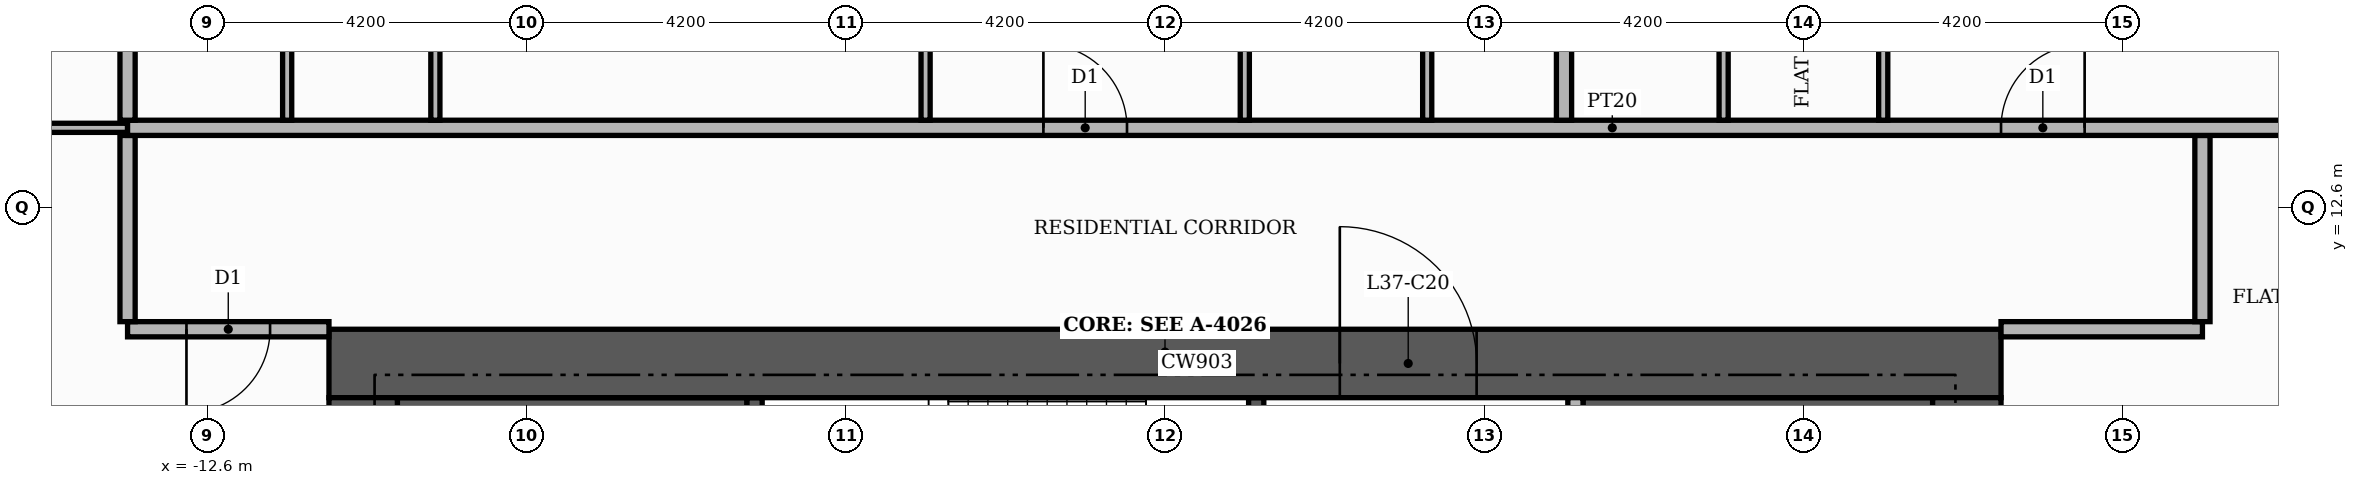
"""IFC4 building model, lengths in metres.
Left out: names, types, materials, properties, quantities, classifications, styles, units other than length and angle.
Written with IfcOpenShell. Run it as: python <this file> out.ifc"""

import sys

from ifc_helpers import new_model, si_unit, direction, frame, frame_2d, origin, place, context, subcontext, project, spatial, rectangle, extrude, element, fill, save


model = new_model("IFC4")
c1 = context("Model", 3, precision=1e-05, world=origin(), true_north=direction((0.0, 1.0)))
c2 = subcontext(c1, "Body", "Model", "MODEL_VIEW")
j1 = project(units=[si_unit("LENGTHUNIT", "METRE"), si_unit("PLANEANGLEUNIT", "RADIAN")], contexts=[c1])
p1 = place(None, origin())
s1 = spatial("IfcSite", under=j1, at=p1, CompositionType="ELEMENT")
p2 = place(p1, origin())
s2 = spatial("IfcBuilding", under=s1, at=p2, CompositionType="ELEMENT")
p3 = place(p2, frame((0.0, 0.0, 157.2)))
s3 = spatial("IfcBuildingStorey", under=s2, at=p3, CompositionType="ELEMENT", Elevation=157.2)
for number, where, z_axis, x_axis in (
    (1, (-10.1, 9.15, 0.0), (0.0, 0.0, 1.0), (1.0, 0.0, 0.0)),
    (2, (5.5, 9.15, 0.0), (0.0, 0.0, 1.0), (1.0, 0.0, 0.0)),
):
    element("IfcWall", number, at=place(p3, frame(where, z_axis=z_axis, x_axis=x_axis)), inside=s3, PredefinedType="SHEAR", context=c2, shape_type="SweptSolid", body=[
        extrude(rectangle(XDim=4.6, YDim=1.9, at=frame_2d((2.3, 0.0))), origin(), (0.0, 0.0, 1.0), 3.48),
    ])
p4 = place(p3, frame((-5.4, 7.25, 0.0), z_axis=(0.0, 0.0, 1.0), x_axis=(0.0, 1.0, 0.0)))
e3 = element("IfcWall", 3, at=p4, inside=s3, PredefinedType="SHEAR", context=c2, shape_type="SweptSolid", body=[
    extrude(rectangle(XDim=2.85, YDim=0.2, at=frame_2d((1.425, 0.0))), origin(), (0.0, 0.0, 1.0), 3.48),
])
p5 = place(p3, frame((1.2, 7.25, 0.0), z_axis=(0.0, 0.0, 1.0), x_axis=(0.0, 1.0, 0.0)))
e4 = element("IfcWall", 4, at=p5, inside=s3, PredefinedType="SHEAR", context=c2, shape_type="SweptSolid", body=[
    extrude(rectangle(XDim=2.85, YDim=0.2, at=frame_2d((1.425, 0.0))), origin(), (0.0, 0.0, 1.0), 3.48),
])
p6 = place(p5, frame((0.85, 0.0, 0.0)))
e5 = element("IfcOpeningElement", 5, at=p6, cuts=e4, PredefinedType="OPENING", context=c2, shape_type="SweptSolid", body=[
    extrude(rectangle(XDim=1.0, YDim=2.1, at=frame_2d((0.5, 1.05))), frame((0.0, 0.11, 0.0), z_axis=(0.0, -1.0, 0.0), x_axis=(1.0, 0.0, 0.0)), (0.0, 0.0, 1.0), 0.22),
])
p7 = place(p3, frame((-11.0, 10.55, 0.0), z_axis=(0.0, 0.0, 1.0), x_axis=(1.0, 0.0, 0.0)))
e6 = element("IfcWall", 6, at=p7, inside=s3, PredefinedType="SHEAR", context=c2, shape_type="SweptSolid", body=[
    extrude(rectangle(XDim=22.0, YDim=0.9, at=frame_2d((11.0, 0.0))), origin(), (0.0, 0.0, 1.0), 3.48),
])
p8 = place(p7, frame((13.3, 0.0, 0.0)))
e7 = element("IfcOpeningElement", 7, at=p8, cuts=e6, PredefinedType="OPENING", context=c2, shape_type="SweptSolid", body=[
    extrude(rectangle(XDim=1.8, YDim=2.2, at=frame_2d((0.9, 1.1))), frame((0.0, 0.46, 0.0), z_axis=(0.0, -1.0, 0.0), x_axis=(1.0, 0.0, 0.0)), (0.0, 0.0, 1.0), 0.92),
])
for number, where, z_axis, x_axis in (
    (8, (-10.55, -10.1, 0.0), (0.0, 0.0, 1.0), (0.0, 1.0, 0.0)),
    (9, (10.55, -10.1, 0.0), (0.0, 0.0, 1.0), (0.0, 1.0, 0.0)),
):
    element("IfcWall", number, at=place(p3, frame(where, z_axis=z_axis, x_axis=x_axis)), inside=s3, PredefinedType="SHEAR", context=c2, shape_type="SweptSolid", body=[
        extrude(rectangle(XDim=20.2, YDim=0.9, at=frame_2d((10.1, 0.0))), origin(), (0.0, 0.0, 1.0), 3.48),
    ])
p9 = place(p3, frame((5.4, 5.5, 0.0), z_axis=(0.0, 0.0, 1.0), x_axis=(0.0, 1.0, 0.0)))
e10 = element("IfcWall", 10, at=p9, inside=s3, PredefinedType="PARTITIONING", context=c2, shape_type="SweptSolid", body=[
    extrude(rectangle(XDim=4.6, YDim=0.2, at=frame_2d((2.3, 0.0))), origin(), (0.0, 0.0, 1.0), 3.48),
])
p10 = place(p9, frame((0.25, 0.0, 0.0)))
e11 = element("IfcOpeningElement", 11, at=p10, cuts=e10, PredefinedType="OPENING", context=c2, shape_type="SweptSolid", body=[
    extrude(rectangle(XDim=1.0, YDim=2.1, at=frame_2d((0.5, 1.05))), frame((0.0, 0.11, 0.0), z_axis=(0.0, -1.0, 0.0), x_axis=(1.0, 0.0, 0.0)), (0.0, 0.0, 1.0), 0.22),
])
p11 = place(p3, frame((-13.65, 11.0, 0.0), z_axis=(0.0, 0.0, 1.0), x_axis=(1.0, 0.0, 0.0)))
e12 = element("IfcWall", 12, at=p11, inside=s3, PredefinedType="PARTITIONING", context=c2, shape_type="SweptSolid", body=[
    extrude(rectangle(XDim=2.65, YDim=0.2, at=frame_2d((1.325, 0.0))), origin(), (0.0, 0.0, 1.0), 3.48),
])
p12 = place(p11, frame((0.775, 0.0, 0.0)))
e13 = element("IfcOpeningElement", 13, at=p12, cuts=e12, PredefinedType="OPENING", context=c2, shape_type="SweptSolid", body=[
    extrude(rectangle(XDim=1.1, YDim=2.4, at=frame_2d((0.55, 1.2))), frame((0.0, 0.11, 0.0), z_axis=(0.0, -1.0, 0.0), x_axis=(1.0, 0.0, 0.0)), (0.0, 0.0, 1.0), 0.22),
])
p13 = place(p3, frame((11.0, 11.0, 0.0), z_axis=(0.0, 0.0, 1.0), x_axis=(1.0, 0.0, 0.0)))
e14 = element("IfcWall", 14, at=p13, inside=s3, PredefinedType="PARTITIONING", context=c2, shape_type="SweptSolid", body=[
    extrude(rectangle(XDim=2.65, YDim=0.2, at=frame_2d((1.325, 0.0))), origin(), (0.0, 0.0, 1.0), 3.48),
])
for number, where, z_axis, x_axis in (
    (15, (-13.65, 11.1, 0.0), (0.0, 0.0, 1.0), (0.0, 1.0, 0.0)),
    (16, (13.65, 11.1, 0.0), (0.0, 0.0, 1.0), (0.0, 1.0, 0.0)),
):
    element("IfcWall", number, at=place(p3, frame(where, z_axis=z_axis, x_axis=x_axis)), inside=s3, PredefinedType="PARTITIONING", context=c2, shape_type="SweptSolid", body=[
        extrude(rectangle(XDim=2.45, YDim=0.2, at=frame_2d((1.225, 0.0))), origin(), (0.0, 0.0, 1.0), 3.48),
    ])
p14 = place(p3, frame((-19.82, 13.65, 0.0), z_axis=(0.0, 0.0, 1.0), x_axis=(1.0, 0.0, 0.0)))
e17 = element("IfcWall", 17, at=p14, inside=s3, PredefinedType="PARTITIONING", context=c2, shape_type="SweptSolid", body=[
    extrude(rectangle(XDim=6.17, YDim=0.12, at=frame_2d((3.085, 0.0))), origin(), (0.0, 0.0, 1.0), 3.48),
])
p15 = place(p14, frame((2.635, 0.0, 0.0)))
e18 = element("IfcOpeningElement", 18, at=p15, cuts=e17, PredefinedType="OPENING", context=c2, shape_type="SweptSolid", body=[
    extrude(rectangle(XDim=0.9, YDim=2.1, at=frame_2d((0.45, 1.05))), frame((0.0, 0.07, 0.0), z_axis=(0.0, -1.0, 0.0), x_axis=(1.0, 0.0, 0.0)), (0.0, 0.0, 1.0), 0.14),
])
p16 = place(p3, frame((-13.65, 13.65, 0.0), z_axis=(0.0, 0.0, 1.0), x_axis=(1.0, 0.0, 0.0)))
e19 = element("IfcWall", 19, at=p16, inside=s3, PredefinedType="PARTITIONING", context=c2, shape_type="SweptSolid", body=[
    extrude(rectangle(XDim=39.07, YDim=0.2, at=frame_2d((19.535, 0.0))), origin(), (0.0, 0.0, 1.0), 3.48),
])
p17 = place(p16, frame((24.65, 0.0, 0.0)))
e20 = element("IfcOpeningElement", 20, at=p17, cuts=e19, PredefinedType="OPENING", context=c2, shape_type="SweptSolid", body=[
    extrude(rectangle(XDim=1.1, YDim=2.4, at=frame_2d((0.55, 1.2))), frame((0.0, 0.11, 0.0), z_axis=(0.0, -1.0, 0.0), x_axis=(1.0, 0.0, 0.0)), (0.0, 0.0, 1.0), 0.22),
])
p18 = place(p16, frame((12.05, 0.0, 0.0)))
e21 = element("IfcOpeningElement", 21, at=p18, cuts=e19, PredefinedType="OPENING", context=c2, shape_type="SweptSolid", body=[
    extrude(rectangle(XDim=1.1, YDim=2.4, at=frame_2d((0.55, 1.2))), frame((0.0, 0.11, 0.0), z_axis=(0.0, -1.0, 0.0), x_axis=(1.0, 0.0, 0.0)), (0.0, 0.0, 1.0), 0.22),
])
p19 = place(p3, frame((-13.65, 13.75, 0.0), z_axis=(0.0, 0.0, 1.0), x_axis=(0.0, 1.0, 0.0)))
e22 = element("IfcWall", 22, at=p19, inside=s3, PredefinedType="PARTITIONING", context=c2, shape_type="SweptSolid", body=[
    extrude(rectangle(XDim=11.67, YDim=0.2, at=frame_2d((5.835, 0.0))), origin(), (0.0, 0.0, 1.0), 3.48),
])
for number, where, z_axis, x_axis in (
    (23, (-11.55, 13.75, 0.0), (0.0, 0.0, 1.0), (0.0, 1.0, 0.0)),
    (24, (-9.6, 13.75, 0.0), (0.0, 0.0, 1.0), (0.0, 1.0, 0.0)),
    (25, (-3.15, 13.75, 0.0), (0.0, 0.0, 1.0), (0.0, 1.0, 0.0)),
):
    element("IfcWall", number, at=place(p3, frame(where, z_axis=z_axis, x_axis=x_axis)), inside=s3, PredefinedType="PARTITIONING", context=c2, shape_type="SweptSolid", body=[
        extrude(rectangle(XDim=4.51, YDim=0.12, at=frame_2d((2.255, 0.0))), origin(), (0.0, 0.0, 1.0), 3.48),
    ])
p20 = place(p3, frame((1.05, 13.75, 0.0), z_axis=(0.0, 0.0, 1.0), x_axis=(0.0, 1.0, 0.0)))
e26 = element("IfcWall", 26, at=p20, inside=s3, PredefinedType="PARTITIONING", context=c2, shape_type="SweptSolid", body=[
    extrude(rectangle(XDim=4.51, YDim=0.12, at=frame_2d((2.255, 0.0))), origin(), (0.0, 0.0, 1.0), 3.48),
])
p21 = place(p20, frame((1.785, 0.0, 0.0)))
e27 = element("IfcOpeningElement", 27, at=p21, cuts=e26, PredefinedType="OPENING", context=c2, shape_type="SweptSolid", body=[
    extrude(rectangle(XDim=0.9, YDim=2.1, at=frame_2d((0.45, 1.05))), frame((0.0, 0.07, 0.0), z_axis=(0.0, -1.0, 0.0), x_axis=(1.0, 0.0, 0.0)), (0.0, 0.0, 1.0), 0.14),
])
p22 = place(p3, frame((3.45, 13.75, 0.0), z_axis=(0.0, 0.0, 1.0), x_axis=(0.0, 1.0, 0.0)))
e28 = element("IfcWall", 28, at=p22, inside=s3, PredefinedType="PARTITIONING", context=c2, shape_type="SweptSolid", body=[
    extrude(rectangle(XDim=4.51, YDim=0.12, at=frame_2d((2.255, 0.0))), origin(), (0.0, 0.0, 1.0), 3.48),
])
p23 = place(p3, frame((5.25, 13.75, 0.0), z_axis=(0.0, 0.0, 1.0), x_axis=(0.0, 1.0, 0.0)))
e29 = element("IfcWall", 29, at=p23, inside=s3, PredefinedType="PARTITIONING", context=c2, shape_type="SweptSolid", body=[
    extrude(rectangle(XDim=6.67, YDim=0.2, at=frame_2d((3.335, 0.0))), origin(), (0.0, 0.0, 1.0), 3.48),
])
p24 = place(p3, frame((7.35, 13.75, 0.0), z_axis=(0.0, 0.0, 1.0), x_axis=(0.0, 1.0, 0.0)))
e30 = element("IfcWall", 30, at=p24, inside=s3, PredefinedType="PARTITIONING", context=c2, shape_type="SweptSolid", body=[
    extrude(rectangle(XDim=4.51, YDim=0.12, at=frame_2d((2.255, 0.0))), origin(), (0.0, 0.0, 1.0), 3.48),
])
p25 = place(p3, frame((9.45, 13.75, 0.0), z_axis=(0.0, 0.0, 1.0), x_axis=(0.0, 1.0, 0.0)))
e31 = element("IfcWall", 31, at=p25, inside=s3, PredefinedType="PARTITIONING", context=c2, shape_type="SweptSolid", body=[
    extrude(rectangle(XDim=4.51, YDim=0.12, at=frame_2d((2.255, 0.0))), origin(), (0.0, 0.0, 1.0), 3.48),
])
p26 = place(p25, frame((1.785, 0.0, 0.0)))
e32 = element("IfcOpeningElement", 32, at=p26, cuts=e31, PredefinedType="OPENING", context=c2, shape_type="SweptSolid", body=[
    extrude(rectangle(XDim=0.9, YDim=2.1, at=frame_2d((0.45, 1.05))), frame((0.0, 0.07, 0.0), z_axis=(0.0, -1.0, 0.0), x_axis=(1.0, 0.0, 0.0)), (0.0, 0.0, 1.0), 0.14),
])
p27 = place(p8, origin())
e33 = element("IfcDoor", 33, at=p27, inside=s3, OperationType="DOUBLE_DOOR_SINGLE_SWING", PredefinedType="DOOR", context=c2, shape_type="SweptSolid", body=[
    extrude(rectangle(XDim=1.8, YDim=2.2, at=frame_2d((0.9, 1.1))), frame((0.0, 0.025, 0.0), z_axis=(0.0, -1.0, 0.0), x_axis=(1.0, 0.0, 0.0)), (0.0, 0.0, 1.0), 0.05),
])
fill(e7, e33)
p28 = place(p17, origin())
e34 = element("IfcDoor", 34, at=p28, inside=s3, OperationType="SINGLE_SWING_RIGHT", PredefinedType="DOOR", context=c2, shape_type="SweptSolid", body=[
    extrude(rectangle(XDim=1.1, YDim=2.4, at=frame_2d((0.55, 1.2))), frame((0.0, 0.025, 0.0), z_axis=(0.0, -1.0, 0.0), x_axis=(1.0, 0.0, 0.0)), (0.0, 0.0, 1.0), 0.05),
])
fill(e20, e34)
p29 = place(p18, origin())
e35 = element("IfcDoor", 35, at=p29, inside=s3, OperationType="SINGLE_SWING_LEFT", PredefinedType="DOOR", context=c2, shape_type="SweptSolid", body=[
    extrude(rectangle(XDim=1.1, YDim=2.4, at=frame_2d((0.55, 1.2))), frame((0.0, 0.025, 0.0), z_axis=(0.0, -1.0, 0.0), x_axis=(1.0, 0.0, 0.0)), (0.0, 0.0, 1.0), 0.05),
])
fill(e21, e35)
p30 = place(p12, frame((1.1, 0.0, 0.0), z_axis=(0.0, 0.0, 1.0), x_axis=(-1.0, 0.0, 0.0)))
e36 = element("IfcDoor", 36, at=p30, inside=s3, OperationType="SINGLE_SWING_LEFT", PredefinedType="DOOR", context=c2, shape_type="SweptSolid", body=[
    extrude(rectangle(XDim=1.1, YDim=2.4, at=frame_2d((0.55, 1.2))), frame((0.0, 0.025, 0.0), z_axis=(0.0, -1.0, 0.0), x_axis=(1.0, 0.0, 0.0)), (0.0, 0.0, 1.0), 0.05),
])
fill(e13, e36)
save(model, sys.argv[1])
